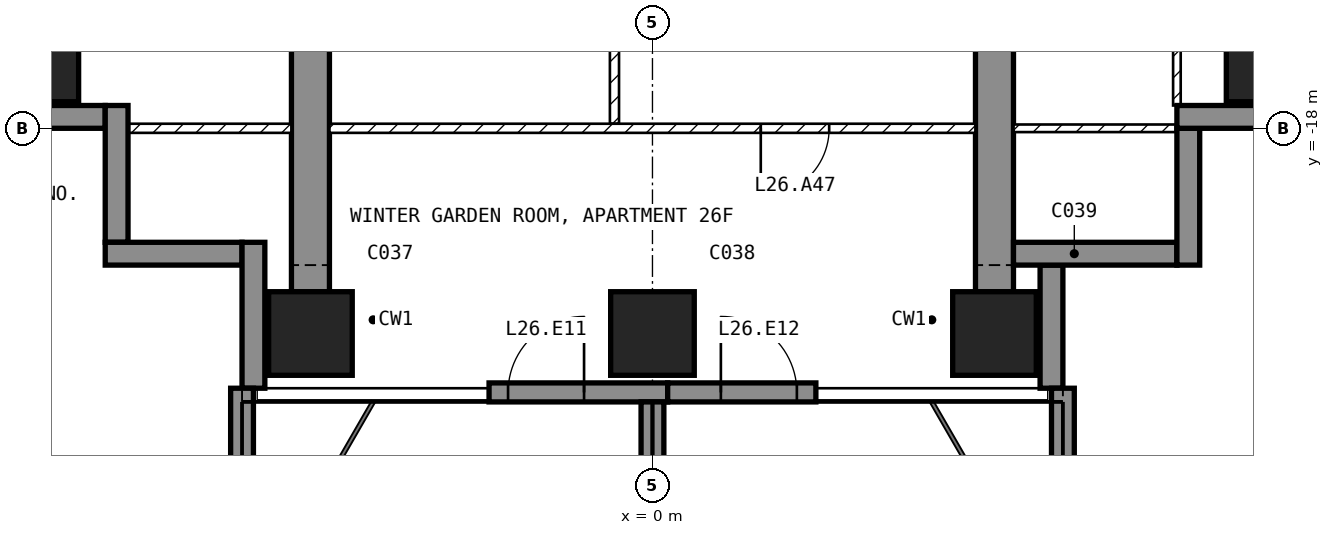
"""IFC4 building model, lengths in metres.
Left out: names, types, materials, properties, quantities, classifications, styles, units other than length and angle.
Written with IfcOpenShell. Run it as: python <this file> out.ifc"""

import sys

from ifc_helpers import new_model, si_unit, direction, frame, frame_2d, origin, origin_2d, place, context, subcontext, project, spatial, polyline, rectangle, outline, extrude, element, fill, save


model = new_model("IFC4")
c1 = context("Model", 3, precision=1e-05, world=origin(), true_north=direction((0.0, 1.0)))
c2 = subcontext(c1, "Body", "Model", "MODEL_VIEW")
j1 = project(units=[si_unit("LENGTHUNIT", "METRE"), si_unit("PLANEANGLEUNIT", "RADIAN")], contexts=[c1])
p1 = place(None, origin())
s1 = spatial("IfcSite", under=j1, at=p1, CompositionType="ELEMENT")
p2 = place(p1, origin())
s2 = spatial("IfcBuilding", under=s1, at=p2, CompositionType="ELEMENT")
p3 = place(p2, frame((0.0, 0.0, 112.9)))
s3 = spatial("IfcBuildingStorey", under=s2, at=p3, CompositionType="ELEMENT", Elevation=112.9)
for number, where, z_axis, x_axis in (
    (1, (-8.1, -17.1, -0.25), (0.0, 0.0, 1.0), (1.0, 0.0, 0.0)),
    (2, (-4.5, -20.7, -0.25), (0.0, 0.0, 1.0), (1.0, 0.0, 0.0)),
    (3, (0.0, -20.7, -0.25), (0.0, 0.0, 1.0), (1.0, 0.0, 0.0)),
    (4, (4.5, -20.7, -0.25), (0.0, 0.0, 1.0), (1.0, 0.0, 0.0)),
    (5, (8.1, -17.1, -0.25), (0.0, 0.0, 1.0), (1.0, 0.0, 0.0)),
):
    element("IfcColumn", number, at=place(p3, frame(where, z_axis=z_axis, x_axis=x_axis)), inside=s3, PredefinedType="COLUMN", context=c2, shape_type="SweptSolid", body=[
        extrude(rectangle(XDim=1.1, YDim=1.1, at=origin_2d()), origin(), (0.0, 0.0, 1.0), 3.5),
    ])
for number, where, z_axis, x_axis in (
    (6, (-4.75, -20.15, -0.25), (1.0, 0.0, 0.0), (0.0, 1.0, 0.0)),
    (7, (4.25, -20.15, -0.25), (1.0, 0.0, 0.0), (0.0, 1.0, 0.0)),
):
    element("IfcWall", number, at=place(p3, frame(where, z_axis=z_axis, x_axis=x_axis)), inside=s3, PredefinedType="SHEAR", context=c2, shape_type="SweptSolid", body=[
        extrude(outline(polyline([(0.0, 0.0), (6.65, 0.0), (6.65, 2.65), (9.05, 2.65), (9.05, 0.0), (11.15, 0.0), (11.15, 3.5), (0.0, 3.5), (0.0, 0.0)])), origin(), (0.0, 0.0, 1.0), 0.5),
    ])
p4 = place(p3, frame((-2.15, -21.475, 0.0), z_axis=(0.0, 0.0, 1.0), x_axis=(1.0, 0.0, 0.0)))
e8 = element("IfcWall", 8, at=p4, inside=s3, PredefinedType="SOLIDWALL", context=c2, shape_type="SweptSolid", body=[
    extrude(rectangle(XDim=2.35, YDim=0.25, at=frame_2d((1.175, 0.0))), origin(), (0.0, 0.0, 1.0), 3.25),
])
p5 = place(p4, frame((0.25, 0.0, 0.0)))
e9 = element("IfcOpeningElement", 9, at=p5, cuts=e8, PredefinedType="OPENING", context=c2, shape_type="SweptSolid", body=[
    extrude(rectangle(XDim=1.0, YDim=2.4, at=frame_2d((0.5, 1.2))), frame((0.0, 0.135, 0.0), z_axis=(0.0, -1.0, 0.0), x_axis=(1.0, 0.0, 0.0)), (0.0, 0.0, 1.0), 0.27),
])
p6 = place(p3, frame((0.2, -21.475, 0.0), z_axis=(0.0, 0.0, 1.0), x_axis=(1.0, 0.0, 0.0)))
e10 = element("IfcWall", 10, at=p6, inside=s3, PredefinedType="SOLIDWALL", context=c2, shape_type="SweptSolid", body=[
    extrude(rectangle(XDim=1.95, YDim=0.25, at=frame_2d((0.975, 0.0))), origin(), (0.0, 0.0, 1.0), 3.25),
])
p7 = place(p6, frame((0.7, 0.0, 0.0)))
e11 = element("IfcOpeningElement", 11, at=p7, cuts=e10, PredefinedType="OPENING", context=c2, shape_type="SweptSolid", body=[
    extrude(rectangle(XDim=1.0, YDim=2.4, at=frame_2d((0.5, 1.2))), frame((0.0, 0.135, 0.0), z_axis=(0.0, -1.0, 0.0), x_axis=(1.0, 0.0, 0.0)), (0.0, 0.0, 1.0), 0.27),
])
p8 = place(p3, frame((5.25, -21.42, 0.0), z_axis=(0.0, 0.0, 1.0), x_axis=(0.0, 1.0, 0.0)))
e12 = element("IfcWall", 12, at=p8, inside=s3, PredefinedType="SOLIDWALL", context=c2, shape_type="SweptSolid", body=[
    extrude(rectangle(XDim=1.62, YDim=0.3, at=frame_2d((0.81, 0.0))), origin(), (0.0, 0.0, 1.0), 3.25),
])
p9 = place(p3, frame((4.75, -19.65, 0.0), z_axis=(0.0, 0.0, 1.0), x_axis=(1.0, 0.0, 0.0)))
e13 = element("IfcWall", 13, at=p9, inside=s3, PredefinedType="SOLIDWALL", context=c2, shape_type="SweptSolid", body=[
    extrude(rectangle(XDim=2.15, YDim=0.3, at=frame_2d((1.075, 0.0))), origin(), (0.0, 0.0, 1.0), 3.25),
])
p10 = place(p3, frame((7.05, -19.8, 0.0), z_axis=(0.0, 0.0, 1.0), x_axis=(0.0, 1.0, 0.0)))
e14 = element("IfcWall", 14, at=p10, inside=s3, PredefinedType="SOLIDWALL", context=c2, shape_type="SweptSolid", body=[
    extrude(rectangle(XDim=1.8, YDim=0.3, at=frame_2d((0.9, 0.0))), origin(), (0.0, 0.0, 1.0), 3.25),
])
p11 = place(p3, frame((6.9, -17.85, 0.0), z_axis=(0.0, 0.0, 1.0), x_axis=(1.0, 0.0, 0.0)))
e15 = element("IfcWall", 15, at=p11, inside=s3, PredefinedType="SOLIDWALL", context=c2, shape_type="SweptSolid", body=[
    extrude(rectangle(XDim=1.85, YDim=0.3, at=frame_2d((0.925, 0.0))), origin(), (0.0, 0.0, 1.0), 3.25),
])
p12 = place(p3, frame((-8.75, -17.85, 0.0), z_axis=(0.0, 0.0, 1.0), x_axis=(1.0, 0.0, 0.0)))
e16 = element("IfcWall", 16, at=p12, inside=s3, PredefinedType="SOLIDWALL", context=c2, shape_type="SweptSolid", body=[
    extrude(rectangle(XDim=1.55, YDim=0.3, at=frame_2d((0.775, 0.0))), origin(), (0.0, 0.0, 1.0), 3.25),
])
for number, where, z_axis, x_axis in (
    (17, (-7.05, -17.7, 0.0), (0.0, 0.0, 1.0), (0.0, -1.0, 0.0)),
    (18, (-7.2, -19.65, 0.0), (0.0, 0.0, 1.0), (1.0, 0.0, 0.0)),
):
    element("IfcWall", number, at=place(p3, frame(where, z_axis=z_axis, x_axis=x_axis)), inside=s3, PredefinedType="SOLIDWALL", context=c2, shape_type="SweptSolid", body=[
        extrude(rectangle(XDim=1.8, YDim=0.3, at=frame_2d((0.9, 0.0))), origin(), (0.0, 0.0, 1.0), 3.25),
    ])
p13 = place(p3, frame((-5.25, -19.5, 0.0), z_axis=(0.0, 0.0, 1.0), x_axis=(0.0, -1.0, 0.0)))
e19 = element("IfcWall", 19, at=p13, inside=s3, PredefinedType="SOLIDWALL", context=c2, shape_type="SweptSolid", body=[
    extrude(rectangle(XDim=1.92, YDim=0.3, at=frame_2d((0.96, 0.0))), origin(), (0.0, 0.0, 1.0), 3.25),
])
p14 = place(p3, frame((-5.4, -21.42, 0.0), z_axis=(0.0, 0.0, 1.0), x_axis=(0.0, -1.0, 0.0)))
e20 = element("IfcWall", 20, at=p14, inside=s3, PredefinedType="SOLIDWALL", context=c2, shape_type="SweptSolid", body=[
    extrude(rectangle(XDim=2.88, YDim=0.3, at=frame_2d((1.44, 0.0))), origin(), (0.0, 0.0, 1.0), 3.25),
])
p15 = place(p3, frame((0.0, -21.6, 0.0), z_axis=(0.0, 0.0, 1.0), x_axis=(0.0, -1.0, 0.0)))
e21 = element("IfcWall", 21, at=p15, inside=s3, PredefinedType="SOLIDWALL", context=c2, shape_type="SweptSolid", body=[
    extrude(rectangle(XDim=2.7, YDim=0.3, at=frame_2d((1.35, 0.0))), origin(), (0.0, 0.0, 1.0), 3.25),
])
p16 = place(p3, frame((5.4, -21.42, 0.0), z_axis=(0.0, 0.0, 1.0), x_axis=(0.0, -1.0, 0.0)))
e22 = element("IfcWall", 22, at=p16, inside=s3, PredefinedType="SOLIDWALL", context=c2, shape_type="SweptSolid", body=[
    extrude(rectangle(XDim=2.88, YDim=0.3, at=frame_2d((1.44, 0.0))), origin(), (0.0, 0.0, 1.0), 3.25),
])
p17 = place(p3, frame((-0.5, -17.94, 0.0), z_axis=(0.0, 0.0, 1.0), x_axis=(0.0, 1.0, 0.0)))
e23 = element("IfcWall", 23, at=p17, inside=s3, PredefinedType="PARTITIONING", context=c2, shape_type="SweptSolid", body=[
    extrude(rectangle(XDim=2.88, YDim=0.12, at=frame_2d((1.44, 0.0))), origin(), (0.0, 0.0, 1.0), 3.25),
])
p18 = place(p17, frame((0.99, 0.0, 0.0)))
e24 = element("IfcOpeningElement", 24, at=p18, cuts=e23, PredefinedType="OPENING", context=c2, shape_type="SweptSolid", body=[
    extrude(rectangle(XDim=0.9, YDim=2.1, at=frame_2d((0.45, 1.05))), frame((0.0, 0.07, 0.0), z_axis=(0.0, -1.0, 0.0), x_axis=(1.0, 0.0, 0.0)), (0.0, 0.0, 1.0), 0.14),
])
p19 = place(p3, frame((4.25, -18.0, 0.0), z_axis=(0.0, 0.0, 1.0), x_axis=(-1.0, 0.0, 0.0)))
e25 = element("IfcWall", 25, at=p19, inside=s3, PredefinedType="PARTITIONING", context=c2, shape_type="SweptSolid", body=[
    extrude(rectangle(XDim=8.5, YDim=0.12, at=frame_2d((4.25, 0.0))), origin(), (0.0, 0.0, 1.0), 3.25),
])
p20 = place(p19, frame((1.925, 0.0, 0.0)))
e26 = element("IfcOpeningElement", 26, at=p20, cuts=e25, PredefinedType="OPENING", context=c2, shape_type="SweptSolid", body=[
    extrude(rectangle(XDim=0.9, YDim=2.1, at=frame_2d((0.45, 1.05))), frame((0.0, 0.07, 0.0), z_axis=(0.0, -1.0, 0.0), x_axis=(1.0, 0.0, 0.0)), (0.0, 0.0, 1.0), 0.14),
])
p21 = place(p3, frame((6.9, -17.7, 0.0), z_axis=(0.0, 0.0, 1.0), x_axis=(0.0, 1.0, 0.0)))
e27 = element("IfcWall", 27, at=p21, inside=s3, PredefinedType="PARTITIONING", context=c2, shape_type="SweptSolid", body=[
    extrude(rectangle(XDim=3.25, YDim=0.1, at=frame_2d((1.625, 0.0))), origin(), (0.0, 0.0, 1.0), 3.25),
])
p22 = place(p21, frame((2.2, 0.0, 0.0)))
e28 = element("IfcOpeningElement", 28, at=p22, cuts=e27, PredefinedType="OPENING", context=c2, shape_type="SweptSolid", body=[
    extrude(rectangle(XDim=0.85, YDim=2.1, at=frame_2d((0.425, 1.05))), frame((0.0, 0.06, 0.0), z_axis=(0.0, -1.0, 0.0), x_axis=(1.0, 0.0, 0.0)), (0.0, 0.0, 1.0), 0.12),
])
p23 = place(p3, frame((7.12, -18.0, 0.0), z_axis=(0.0, 0.0, 1.0), x_axis=(-1.0, 0.0, 0.0)))
e29 = element("IfcWall", 29, at=p23, inside=s3, PredefinedType="PARTITIONING", context=c2, shape_type="SweptSolid", body=[
    extrude(rectangle(XDim=2.37, YDim=0.1, at=frame_2d((1.185, 0.0))), origin(), (0.0, 0.0, 1.0), 3.25),
])
p24 = place(p3, frame((-4.75, -18.0, 0.0), z_axis=(0.0, 0.0, 1.0), x_axis=(-1.0, 0.0, 0.0)))
e30 = element("IfcWall", 30, at=p24, inside=s3, PredefinedType="PARTITIONING", context=c2, shape_type="SweptSolid", body=[
    extrude(rectangle(XDim=2.37, YDim=0.12, at=frame_2d((1.185, 0.0))), origin(), (0.0, 0.0, 1.0), 3.25),
])
p25 = place(p5, origin())
e31 = element("IfcDoor", 31, at=p25, inside=s3, OperationType="SINGLE_SWING_RIGHT", PredefinedType="DOOR", context=c2, shape_type="SweptSolid", body=[
    extrude(rectangle(XDim=1.0, YDim=2.4, at=frame_2d((0.5, 1.2))), frame((0.0, 0.025, 0.0), z_axis=(0.0, -1.0, 0.0), x_axis=(1.0, 0.0, 0.0)), (0.0, 0.0, 1.0), 0.05),
])
fill(e9, e31)
p26 = place(p7, origin())
e32 = element("IfcDoor", 32, at=p26, inside=s3, OperationType="SINGLE_SWING_LEFT", PredefinedType="DOOR", context=c2, shape_type="SweptSolid", body=[
    extrude(rectangle(XDim=1.0, YDim=2.4, at=frame_2d((0.5, 1.2))), frame((0.0, 0.025, 0.0), z_axis=(0.0, -1.0, 0.0), x_axis=(1.0, 0.0, 0.0)), (0.0, 0.0, 1.0), 0.05),
])
fill(e11, e32)
p27 = place(p20, origin())
e33 = element("IfcDoor", 33, at=p27, inside=s3, OperationType="SINGLE_SWING_RIGHT", PredefinedType="DOOR", context=c2, shape_type="SweptSolid", body=[
    extrude(rectangle(XDim=0.9, YDim=2.1, at=frame_2d((0.45, 1.05))), frame((0.0, 0.025, 0.0), z_axis=(0.0, -1.0, 0.0), x_axis=(1.0, 0.0, 0.0)), (0.0, 0.0, 1.0), 0.05),
])
fill(e26, e33)
save(model, sys.argv[1])
